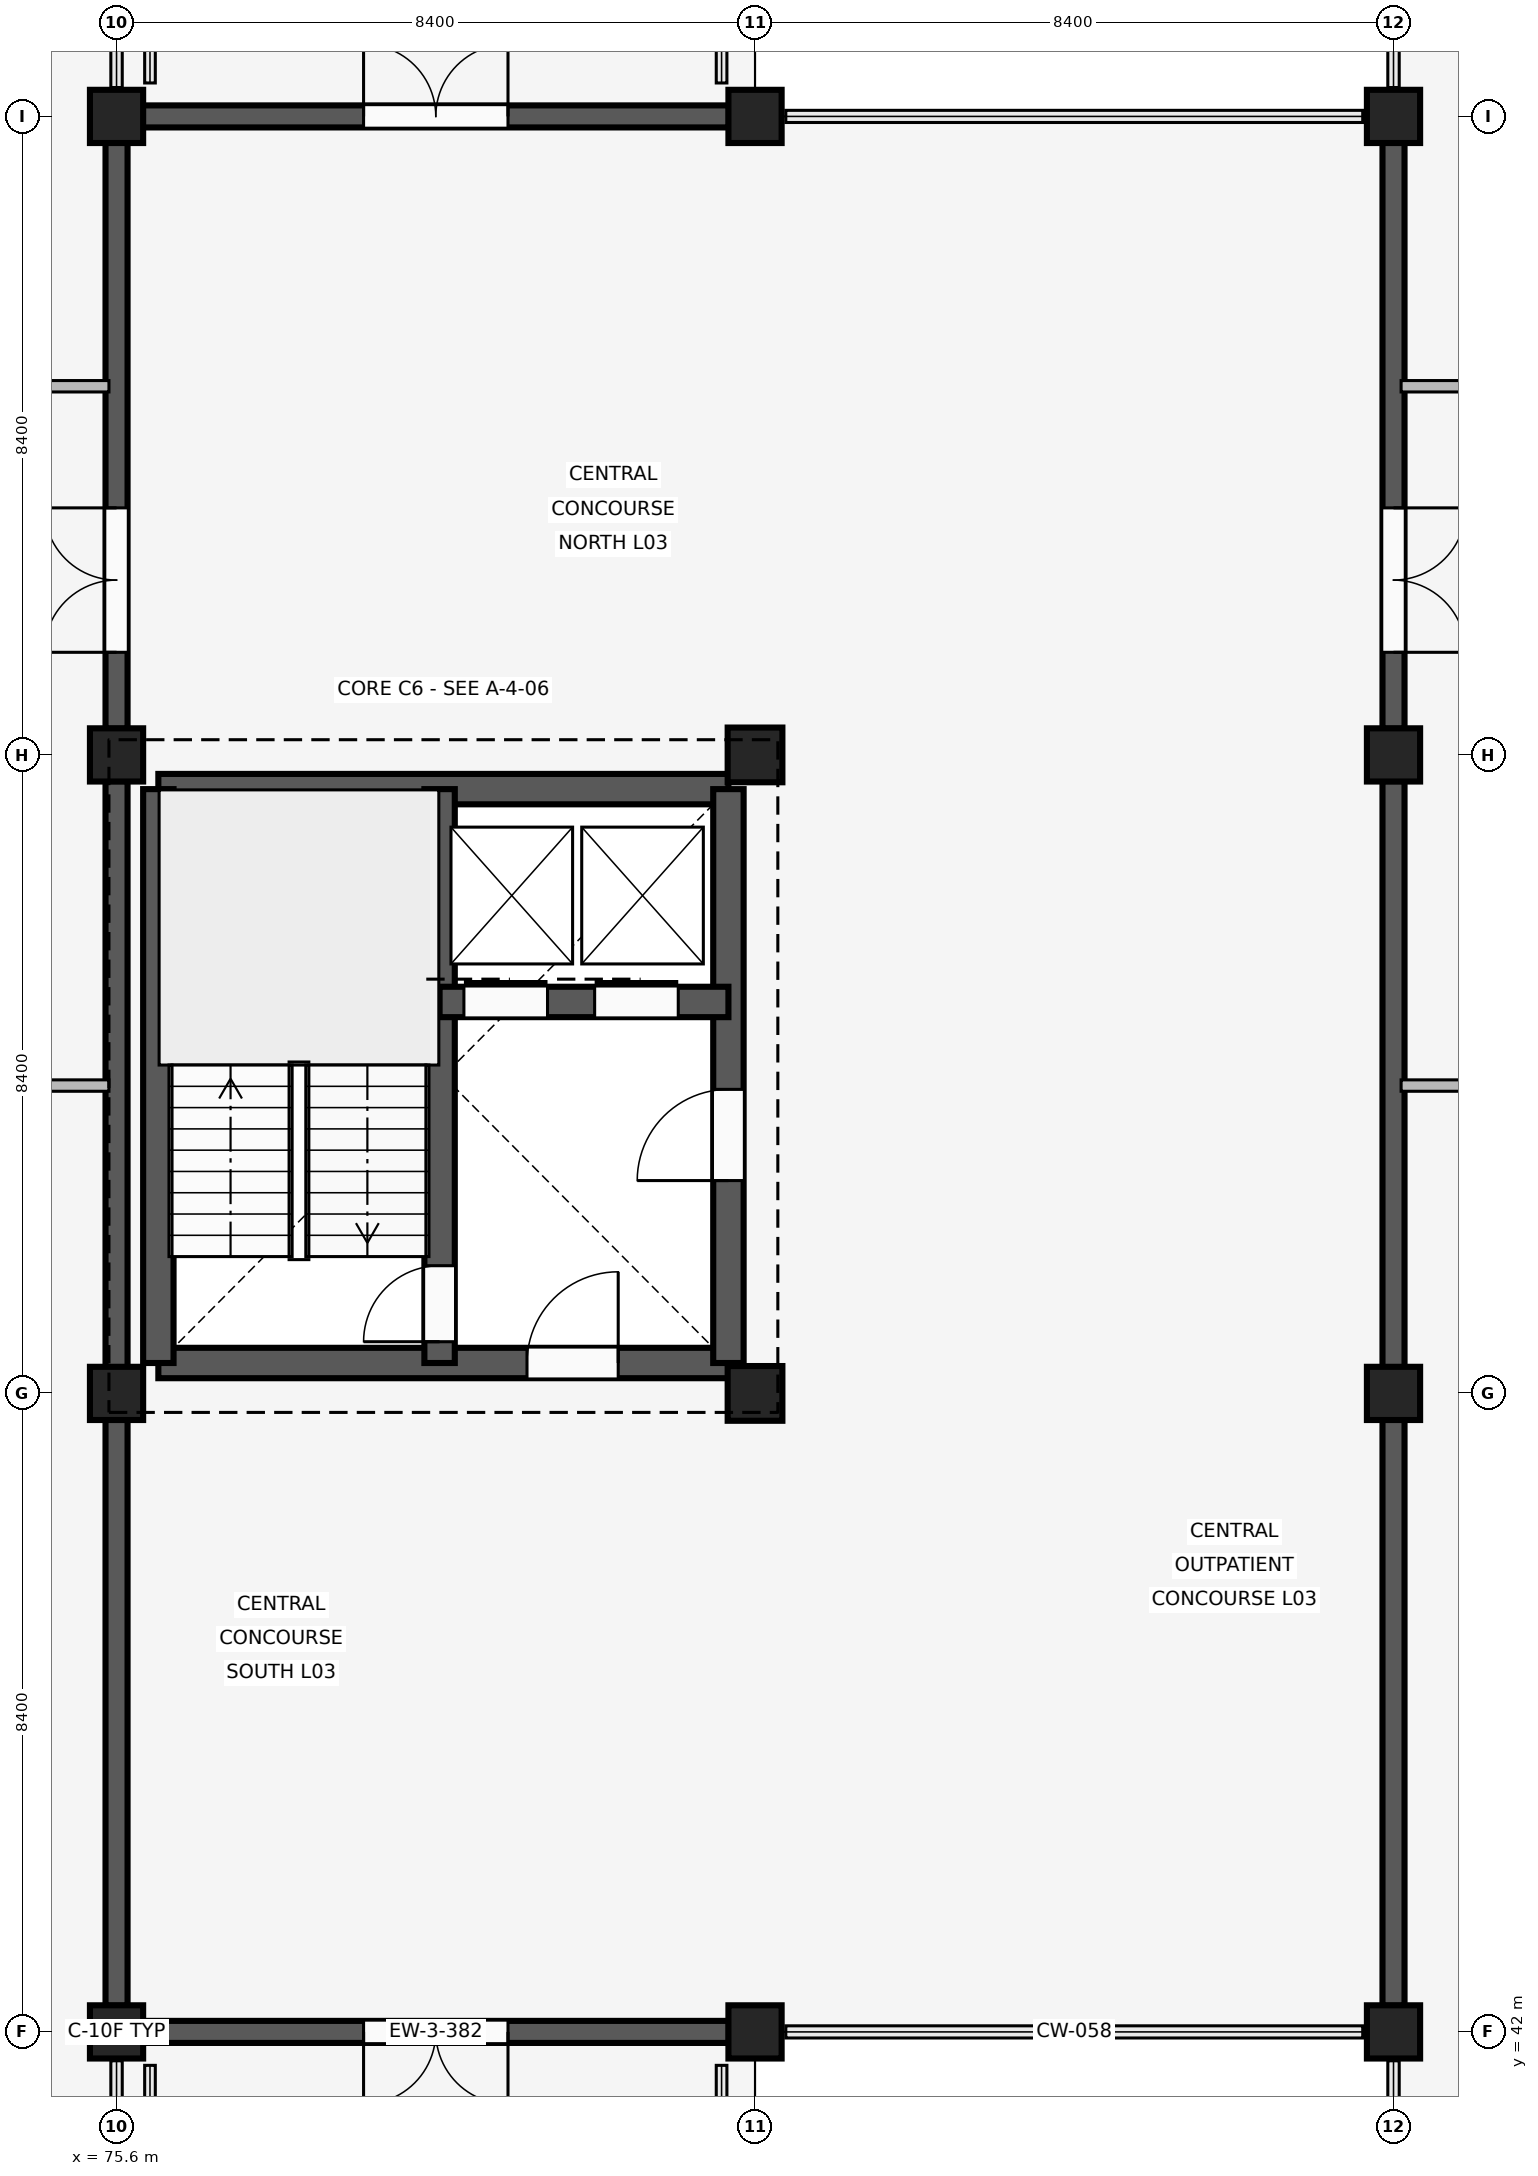
"""IFC4 building model, lengths in metres.
Left out: names, types, materials, properties, quantities, classifications, styles, units other than length and angle.
Written with IfcOpenShell. Run it as: python <this file> out.ifc"""

import sys

from ifc_helpers import new_model, si_unit, direction, frame, frame_2d, origin, origin_2d, place, context, subcontext, project, spatial, rectangle, extrude, element, fill, save


model = new_model("IFC4")
c1 = context("Model", 3, precision=1e-05, world=origin(), true_north=direction((0.0, 1.0)))
c2 = subcontext(c1, "Body", "Model", "MODEL_VIEW")
j1 = project(units=[si_unit("LENGTHUNIT", "METRE"), si_unit("PLANEANGLEUNIT", "RADIAN")], contexts=[c1])
p1 = place(None, origin())
s1 = spatial("IfcSite", under=j1, at=p1, CompositionType="ELEMENT")
p2 = place(p1, origin())
s2 = spatial("IfcBuilding", under=s1, at=p2, CompositionType="ELEMENT")
p3 = place(p2, frame((0.0, 0.0, 12.9)))
s3 = spatial("IfcBuildingStorey", under=s2, at=p3, CompositionType="ELEMENT", Elevation=12.9)
for number, where, z_axis, x_axis in (
    (1, (75.6, 42.0, 0.0), (0.0, 0.0, 1.0), (1.0, 0.0, 0.0)),
    (2, (75.6, 50.4, 0.0), (0.0, 0.0, 1.0), (1.0, 0.0, 0.0)),
    (3, (75.6, 58.8, 0.0), (0.0, 0.0, 1.0), (1.0, 0.0, 0.0)),
    (4, (75.6, 67.2, 0.0), (0.0, 0.0, 1.0), (1.0, 0.0, 0.0)),
    (5, (84.0, 42.0, 0.0), (0.0, 0.0, 1.0), (1.0, 0.0, 0.0)),
):
    element("IfcColumn", number, at=place(p3, frame(where, z_axis=z_axis, x_axis=x_axis)), inside=s3, PredefinedType="COLUMN", context=c2, shape_type="SweptSolid", body=[
        extrude(rectangle(XDim=0.7, YDim=0.7, at=origin_2d()), origin(), (0.0, 0.0, 1.0), 3.3),
    ])
for number, where, z_axis, x_axis in (
    (6, (84.0, 50.4, 0.0), (0.0, 0.0, 1.0), (1.0, 0.0, 0.0)),
    (7, (84.0, 58.8, 0.0), (0.0, 0.0, 1.0), (1.0, 0.0, 0.0)),
):
    element("IfcColumn", number, at=place(p3, frame(where, z_axis=z_axis, x_axis=x_axis)), inside=s3, PredefinedType="COLUMN", context=c2, shape_type="SweptSolid", body=[
        extrude(rectangle(XDim=0.72, YDim=0.72, at=origin_2d()), origin(), (0.0, 0.0, 1.0), 3.3),
    ])
for number, where, z_axis, x_axis in (
    (8, (84.0, 67.2, 0.0), (0.0, 0.0, 1.0), (1.0, 0.0, 0.0)),
    (9, (92.4, 42.0, 0.0), (0.0, 0.0, 1.0), (1.0, 0.0, 0.0)),
    (10, (92.4, 50.4, 0.0), (0.0, 0.0, 1.0), (1.0, 0.0, 0.0)),
    (11, (92.4, 58.8, 0.0), (0.0, 0.0, 1.0), (1.0, 0.0, 0.0)),
    (12, (92.4, 67.2, 0.0), (0.0, 0.0, 1.0), (1.0, 0.0, 0.0)),
):
    element("IfcColumn", number, at=place(p3, frame(where, z_axis=z_axis, x_axis=x_axis)), inside=s3, PredefinedType="COLUMN", context=c2, shape_type="SweptSolid", body=[
        extrude(rectangle(XDim=0.7, YDim=0.7, at=origin_2d()), origin(), (0.0, 0.0, 1.0), 3.3),
    ])
p4 = place(p3, frame((83.655, 42.0, 0.0), z_axis=(0.0, 0.0, 1.0), x_axis=(-1.0, 0.0, 0.0)))
e13 = element("IfcWall", 13, at=p4, inside=s3, PredefinedType="SOLIDWALL", context=c2, shape_type="SweptSolid", body=[
    extrude(rectangle(XDim=7.71, YDim=0.29, at=frame_2d((3.855, 0.0))), origin(), (0.0, 0.0, 1.0), 2.44),
])
p5 = place(p4, frame((2.905, 0.0, 0.0)))
e14 = element("IfcOpeningElement", 14, at=p5, cuts=e13, PredefinedType="OPENING", context=c2, shape_type="SweptSolid", body=[
    extrude(rectangle(XDim=1.9, YDim=2.32, at=frame_2d((0.95, 1.16))), frame((0.0, 0.155, 0.0), z_axis=(0.0, -1.0, 0.0), x_axis=(1.0, 0.0, 0.0)), (0.0, 0.0, 1.0), 0.31),
])
for number, where, z_axis, x_axis in (
    (15, (75.6, 42.345, 0.0), (0.0, 0.0, 1.0), (0.0, 1.0, 0.0)),
    (16, (75.6, 50.745, 0.0), (0.0, 0.0, 1.0), (0.0, 1.0, 0.0)),
):
    element("IfcWall", number, at=place(p3, frame(where, z_axis=z_axis, x_axis=x_axis)), inside=s3, PredefinedType="SOLIDWALL", context=c2, shape_type="SweptSolid", body=[
        extrude(rectangle(XDim=7.71, YDim=0.29, at=frame_2d((3.855, 0.0))), origin(), (0.0, 0.0, 1.0), 2.44),
    ])
p6 = place(p3, frame((75.945, 67.2, 0.0), z_axis=(0.0, 0.0, 1.0), x_axis=(1.0, 0.0, 0.0)))
e17 = element("IfcWall", 17, at=p6, inside=s3, PredefinedType="SOLIDWALL", context=c2, shape_type="SweptSolid", body=[
    extrude(rectangle(XDim=7.71, YDim=0.29, at=frame_2d((3.855, 0.0))), origin(), (0.0, 0.0, 1.0), 2.44),
])
p7 = place(p6, frame((2.905, 0.0, 0.0)))
e18 = element("IfcOpeningElement", 18, at=p7, cuts=e17, PredefinedType="OPENING", context=c2, shape_type="SweptSolid", body=[
    extrude(rectangle(XDim=1.9, YDim=2.32, at=frame_2d((0.95, 1.16))), frame((0.0, 0.155, 0.0), z_axis=(0.0, -1.0, 0.0), x_axis=(1.0, 0.0, 0.0)), (0.0, 0.0, 1.0), 0.31),
])
p8 = place(p3, frame((75.6, 59.145, 0.0), z_axis=(0.0, 0.0, 1.0), x_axis=(0.0, 1.0, 0.0)))
e19 = element("IfcWall", 19, at=p8, inside=s3, PredefinedType="SOLIDWALL", context=c2, shape_type="SweptSolid", body=[
    extrude(rectangle(XDim=7.71, YDim=0.29, at=frame_2d((3.855, 0.0))), origin(), (0.0, 0.0, 1.0), 2.44),
])
p9 = place(p8, frame((1.005, 0.0, 0.0)))
e20 = element("IfcOpeningElement", 20, at=p9, cuts=e19, PredefinedType="OPENING", context=c2, shape_type="SweptSolid", body=[
    extrude(rectangle(XDim=1.9, YDim=2.34, at=frame_2d((0.95, 1.17))), frame((0.0, 0.155, 0.0), z_axis=(0.0, -1.0, 0.0), x_axis=(1.0, 0.0, 0.0)), (0.0, 0.0, 1.0), 0.31),
])
for number, where, z_axis, x_axis in (
    (21, (92.4, 50.055, 0.0), (0.0, 0.0, 1.0), (0.0, -1.0, 0.0)),
    (22, (92.4, 58.455, 0.0), (0.0, 0.0, 1.0), (0.0, -1.0, 0.0)),
):
    element("IfcWall", number, at=place(p3, frame(where, z_axis=z_axis, x_axis=x_axis)), inside=s3, PredefinedType="SOLIDWALL", context=c2, shape_type="SweptSolid", body=[
        extrude(rectangle(XDim=7.71, YDim=0.29, at=frame_2d((3.855, 0.0))), origin(), (0.0, 0.0, 1.0), 2.44),
    ])
p10 = place(p3, frame((92.4, 66.855, 0.0), z_axis=(0.0, 0.0, 1.0), x_axis=(0.0, -1.0, 0.0)))
e23 = element("IfcWall", 23, at=p10, inside=s3, PredefinedType="SOLIDWALL", context=c2, shape_type="SweptSolid", body=[
    extrude(rectangle(XDim=7.71, YDim=0.29, at=frame_2d((3.855, 0.0))), origin(), (0.0, 0.0, 1.0), 2.44),
])
p11 = place(p10, frame((4.805, 0.0, 0.0)))
e24 = element("IfcOpeningElement", 24, at=p11, cuts=e23, PredefinedType="OPENING", context=c2, shape_type="SweptSolid", body=[
    extrude(rectangle(XDim=1.9, YDim=2.34, at=frame_2d((0.95, 1.17))), frame((0.0, 0.155, 0.0), z_axis=(0.0, -1.0, 0.0), x_axis=(1.0, 0.0, 0.0)), (0.0, 0.0, 1.0), 0.31),
])
p12 = place(p3, frame((76.15, 50.8, 0.0), z_axis=(0.0, 0.0, 1.0), x_axis=(1.0, 0.0, 0.0)))
e25 = element("IfcWall", 25, at=p12, inside=s3, PredefinedType="SHEAR", context=c2, shape_type="SweptSolid", body=[
    extrude(rectangle(XDim=7.5, YDim=0.4, at=frame_2d((3.75, 0.0))), origin(), (0.0, 0.0, 1.0), 3.02),
])
p13 = place(p12, frame((4.85, 0.0, 0.0)))
e26 = element("IfcOpeningElement", 26, at=p13, cuts=e25, PredefinedType="OPENING", context=c2, shape_type="SweptSolid", body=[
    extrude(rectangle(XDim=1.2, YDim=2.2, at=frame_2d((0.6, 1.1))), frame((0.0, 0.21, 0.0), z_axis=(0.0, -1.0, 0.0), x_axis=(1.0, 0.0, 0.0)), (0.0, 0.0, 1.0), 0.42),
])
p14 = place(p3, frame((76.15, 58.35, 0.0), z_axis=(0.0, 0.0, 1.0), x_axis=(1.0, 0.0, 0.0)))
e27 = element("IfcWall", 27, at=p14, inside=s3, PredefinedType="SHEAR", context=c2, shape_type="SweptSolid", body=[
    extrude(rectangle(XDim=7.5, YDim=0.4, at=frame_2d((3.75, 0.0))), origin(), (0.0, 0.0, 1.0), 3.02),
])
p15 = place(p3, frame((76.15, 50.8, 0.0), z_axis=(0.0, 0.0, 1.0), x_axis=(0.0, 1.0, 0.0)))
e28 = element("IfcWall", 28, at=p15, inside=s3, PredefinedType="SHEAR", context=c2, shape_type="SweptSolid", body=[
    extrude(rectangle(XDim=7.55, YDim=0.4, at=frame_2d((3.775, 0.0))), origin(), (0.0, 0.0, 1.0), 3.02),
])
p16 = place(p3, frame((83.65, 50.8, 0.0), z_axis=(0.0, 0.0, 1.0), x_axis=(0.0, 1.0, 0.0)))
e29 = element("IfcWall", 29, at=p16, inside=s3, PredefinedType="SHEAR", context=c2, shape_type="SweptSolid", body=[
    extrude(rectangle(XDim=7.55, YDim=0.4, at=frame_2d((3.775, 0.0))), origin(), (0.0, 0.0, 1.0), 3.02),
])
p17 = place(p16, frame((2.4, 0.0, 0.0)))
e30 = element("IfcOpeningElement", 30, at=p17, cuts=e29, PredefinedType="OPENING", context=c2, shape_type="SweptSolid", body=[
    extrude(rectangle(XDim=1.2, YDim=2.2, at=frame_2d((0.6, 1.1))), frame((0.0, 0.21, 0.0), z_axis=(0.0, -1.0, 0.0), x_axis=(1.0, 0.0, 0.0)), (0.0, 0.0, 1.0), 0.42),
])
p18 = place(p3, frame((79.85, 50.8, 0.0), z_axis=(0.0, 0.0, 1.0), x_axis=(0.0, 1.0, 0.0)))
e31 = element("IfcWall", 31, at=p18, inside=s3, PredefinedType="SHEAR", context=c2, shape_type="SweptSolid", body=[
    extrude(rectangle(XDim=7.55, YDim=0.4, at=frame_2d((3.775, 0.0))), origin(), (0.0, 0.0, 1.0), 3.02),
])
p19 = place(p18, frame((0.28, 0.0, 0.0)))
e32 = element("IfcOpeningElement", 32, at=p19, cuts=e31, PredefinedType="OPENING", context=c2, shape_type="SweptSolid", body=[
    extrude(rectangle(XDim=1.0, YDim=2.15, at=frame_2d((0.5, 1.075))), frame((0.0, 0.21, 0.0), z_axis=(0.0, -1.0, 0.0), x_axis=(1.0, 0.0, 0.0)), (0.0, 0.0, 1.0), 0.42),
])
p20 = place(p3, frame((79.85, 55.55, 0.0), z_axis=(0.0, 0.0, 1.0), x_axis=(1.0, 0.0, 0.0)))
e33 = element("IfcWall", 33, at=p20, inside=s3, PredefinedType="SHEAR", context=c2, shape_type="SweptSolid", body=[
    extrude(rectangle(XDim=3.8, YDim=0.4, at=frame_2d((1.9, 0.0))), origin(), (0.0, 0.0, 1.0), 3.02),
])
p21 = place(p20, frame((0.32, 0.0, 0.0)))
e34 = element("IfcOpeningElement", 34, at=p21, cuts=e33, PredefinedType="OPENING", context=c2, shape_type="SweptSolid", body=[
    extrude(rectangle(XDim=1.1, YDim=2.15, at=frame_2d((0.55, 1.075))), frame((0.0, 0.21, 0.0), z_axis=(0.0, -1.0, 0.0), x_axis=(1.0, 0.0, 0.0)), (0.0, 0.0, 1.0), 0.42),
])
p22 = place(p20, frame((2.04, 0.0, 0.0)))
e35 = element("IfcOpeningElement", 35, at=p22, cuts=e33, PredefinedType="OPENING", context=c2, shape_type="SweptSolid", body=[
    extrude(rectangle(XDim=1.1, YDim=2.15, at=frame_2d((0.55, 1.075))), frame((0.0, 0.21, 0.0), z_axis=(0.0, -1.0, 0.0), x_axis=(1.0, 0.0, 0.0)), (0.0, 0.0, 1.0), 0.42),
])
p23 = place(p3, frame((53.3, 54.45, 0.0), z_axis=(0.0, 0.0, 1.0), x_axis=(1.0, 0.0, 0.0)))
e36 = element("IfcWall", 36, at=p23, inside=s3, PredefinedType="PARTITIONING", context=c2, shape_type="SweptSolid", body=[
    extrude(rectangle(XDim=22.2, YDim=0.15, at=frame_2d((11.1, 0.0))), origin(), (0.0, 0.0, 1.0), 2.59),
])
p24 = place(p23, frame((2.6, 0.0, 0.0)))
e37 = element("IfcOpeningElement", 37, at=p24, cuts=e36, PredefinedType="OPENING", context=c2, shape_type="SweptSolid", body=[
    extrude(rectangle(XDim=1.0, YDim=2.15, at=frame_2d((0.5, 1.075))), frame((0.0, 0.085, 0.0), z_axis=(0.0, -1.0, 0.0), x_axis=(1.0, 0.0, 0.0)), (0.0, 0.0, 1.0), 0.17),
])
p25 = place(p3, frame((53.3, 63.65, 0.0), z_axis=(0.0, 0.0, 1.0), x_axis=(1.0, 0.0, 0.0)))
e38 = element("IfcWall", 38, at=p25, inside=s3, PredefinedType="PARTITIONING", context=c2, shape_type="SweptSolid", body=[
    extrude(rectangle(XDim=22.2, YDim=0.15, at=frame_2d((11.1, 0.0))), origin(), (0.0, 0.0, 1.0), 2.59),
])
p26 = place(p25, frame((2.6, 0.0, 0.0)))
e39 = element("IfcOpeningElement", 39, at=p26, cuts=e38, PredefinedType="OPENING", context=c2, shape_type="SweptSolid", body=[
    extrude(rectangle(XDim=1.05, YDim=2.2, at=frame_2d((0.525, 1.1))), frame((0.0, 0.085, 0.0), z_axis=(0.0, -1.0, 0.0), x_axis=(1.0, 0.0, 0.0)), (0.0, 0.0, 1.0), 0.17),
])
p27 = place(p3, frame((92.5, 54.45, 0.0), z_axis=(0.0, 0.0, 1.0), x_axis=(1.0, 0.0, 0.0)))
e40 = element("IfcWall", 40, at=p27, inside=s3, PredefinedType="PARTITIONING", context=c2, shape_type="SweptSolid", body=[
    extrude(rectangle(XDim=22.2, YDim=0.15, at=frame_2d((11.1, 0.0))), origin(), (0.0, 0.0, 1.0), 2.59),
])
p28 = place(p27, frame((2.6, 0.0, 0.0)))
e41 = element("IfcOpeningElement", 41, at=p28, cuts=e40, PredefinedType="OPENING", context=c2, shape_type="SweptSolid", body=[
    extrude(rectangle(XDim=1.0, YDim=2.15, at=frame_2d((0.5, 1.075))), frame((0.0, 0.085, 0.0), z_axis=(0.0, -1.0, 0.0), x_axis=(1.0, 0.0, 0.0)), (0.0, 0.0, 1.0), 0.17),
])
p29 = place(p3, frame((92.5, 63.65, 0.0), z_axis=(0.0, 0.0, 1.0), x_axis=(1.0, 0.0, 0.0)))
e42 = element("IfcWall", 42, at=p29, inside=s3, PredefinedType="PARTITIONING", context=c2, shape_type="SweptSolid", body=[
    extrude(rectangle(XDim=22.2, YDim=0.15, at=frame_2d((11.1, 0.0))), origin(), (0.0, 0.0, 1.0), 2.59),
])
p30 = place(p29, frame((2.6, 0.0, 0.0)))
e43 = element("IfcOpeningElement", 43, at=p30, cuts=e42, PredefinedType="OPENING", context=c2, shape_type="SweptSolid", body=[
    extrude(rectangle(XDim=1.05, YDim=2.2, at=frame_2d((0.525, 1.1))), frame((0.0, 0.085, 0.0), z_axis=(0.0, -1.0, 0.0), x_axis=(1.0, 0.0, 0.0)), (0.0, 0.0, 1.0), 0.17),
])
p31 = place(p5, origin())
e44 = element("IfcDoor", 44, at=p31, inside=s3, OperationType="DOUBLE_SWING_LEFT", PredefinedType="DOOR", context=c2, shape_type="SweptSolid", body=[
    extrude(rectangle(XDim=1.9, YDim=2.32, at=frame_2d((0.95, 1.16))), frame((0.0, 0.025, 0.0), z_axis=(0.0, -1.0, 0.0), x_axis=(1.0, 0.0, 0.0)), (0.0, 0.0, 1.0), 0.05),
])
fill(e14, e44)
p32 = place(p7, origin())
e45 = element("IfcDoor", 45, at=p32, inside=s3, OperationType="DOUBLE_SWING_LEFT", PredefinedType="DOOR", context=c2, shape_type="SweptSolid", body=[
    extrude(rectangle(XDim=1.9, YDim=2.32, at=frame_2d((0.95, 1.16))), frame((0.0, 0.025, 0.0), z_axis=(0.0, -1.0, 0.0), x_axis=(1.0, 0.0, 0.0)), (0.0, 0.0, 1.0), 0.05),
])
fill(e18, e45)
p33 = place(p9, origin())
e46 = element("IfcDoor", 46, at=p33, inside=s3, OperationType="DOUBLE_SWING_LEFT", PredefinedType="DOOR", context=c2, shape_type="SweptSolid", body=[
    extrude(rectangle(XDim=1.9, YDim=2.34, at=frame_2d((0.95, 1.17))), frame((0.0, 0.025, 0.0), z_axis=(0.0, -1.0, 0.0), x_axis=(1.0, 0.0, 0.0)), (0.0, 0.0, 1.0), 0.05),
])
fill(e20, e46)
p34 = place(p11, origin())
e47 = element("IfcDoor", 47, at=p34, inside=s3, OperationType="DOUBLE_SWING_LEFT", PredefinedType="DOOR", context=c2, shape_type="SweptSolid", body=[
    extrude(rectangle(XDim=1.9, YDim=2.34, at=frame_2d((0.95, 1.17))), frame((0.0, 0.025, 0.0), z_axis=(0.0, -1.0, 0.0), x_axis=(1.0, 0.0, 0.0)), (0.0, 0.0, 1.0), 0.05),
])
fill(e24, e47)
p35 = place(p17, origin())
e48 = element("IfcDoor", 48, at=p35, inside=s3, OperationType="SINGLE_SWING_LEFT", PredefinedType="DOOR", context=c2, shape_type="SweptSolid", body=[
    extrude(rectangle(XDim=1.2, YDim=2.2, at=frame_2d((0.6, 1.1))), frame((0.0, 0.025, 0.0), z_axis=(0.0, -1.0, 0.0), x_axis=(1.0, 0.0, 0.0)), (0.0, 0.0, 1.0), 0.05),
])
fill(e30, e48)
p36 = place(p13, origin())
e49 = element("IfcDoor", 49, at=p36, inside=s3, OperationType="SINGLE_SWING_RIGHT", PredefinedType="DOOR", context=c2, shape_type="SweptSolid", body=[
    extrude(rectangle(XDim=1.2, YDim=2.2, at=frame_2d((0.6, 1.1))), frame((0.0, 0.025, 0.0), z_axis=(0.0, -1.0, 0.0), x_axis=(1.0, 0.0, 0.0)), (0.0, 0.0, 1.0), 0.05),
])
fill(e26, e49)
p37 = place(p19, origin())
e50 = element("IfcDoor", 50, at=p37, inside=s3, OperationType="SINGLE_SWING_LEFT", PredefinedType="DOOR", context=c2, shape_type="SweptSolid", body=[
    extrude(rectangle(XDim=1.0, YDim=2.15, at=frame_2d((0.5, 1.075))), frame((0.0, 0.025, 0.0), z_axis=(0.0, -1.0, 0.0), x_axis=(1.0, 0.0, 0.0)), (0.0, 0.0, 1.0), 0.05),
])
fill(e32, e50)
p38 = place(p21, origin())
e51 = element("IfcDoor", 51, at=p38, inside=s3, OperationType="SLIDING_TO_LEFT", PredefinedType="DOOR", context=c2, shape_type="SweptSolid", body=[
    extrude(rectangle(XDim=1.1, YDim=2.15, at=frame_2d((0.55, 1.075))), frame((0.0, 0.025, 0.0), z_axis=(0.0, -1.0, 0.0), x_axis=(1.0, 0.0, 0.0)), (0.0, 0.0, 1.0), 0.05),
])
fill(e34, e51)
p39 = place(p22, origin())
e52 = element("IfcDoor", 52, at=p39, inside=s3, OperationType="SLIDING_TO_LEFT", PredefinedType="DOOR", context=c2, shape_type="SweptSolid", body=[
    extrude(rectangle(XDim=1.1, YDim=2.15, at=frame_2d((0.55, 1.075))), frame((0.0, 0.025, 0.0), z_axis=(0.0, -1.0, 0.0), x_axis=(1.0, 0.0, 0.0)), (0.0, 0.0, 1.0), 0.05),
])
fill(e35, e52)
save(model, sys.argv[1])
